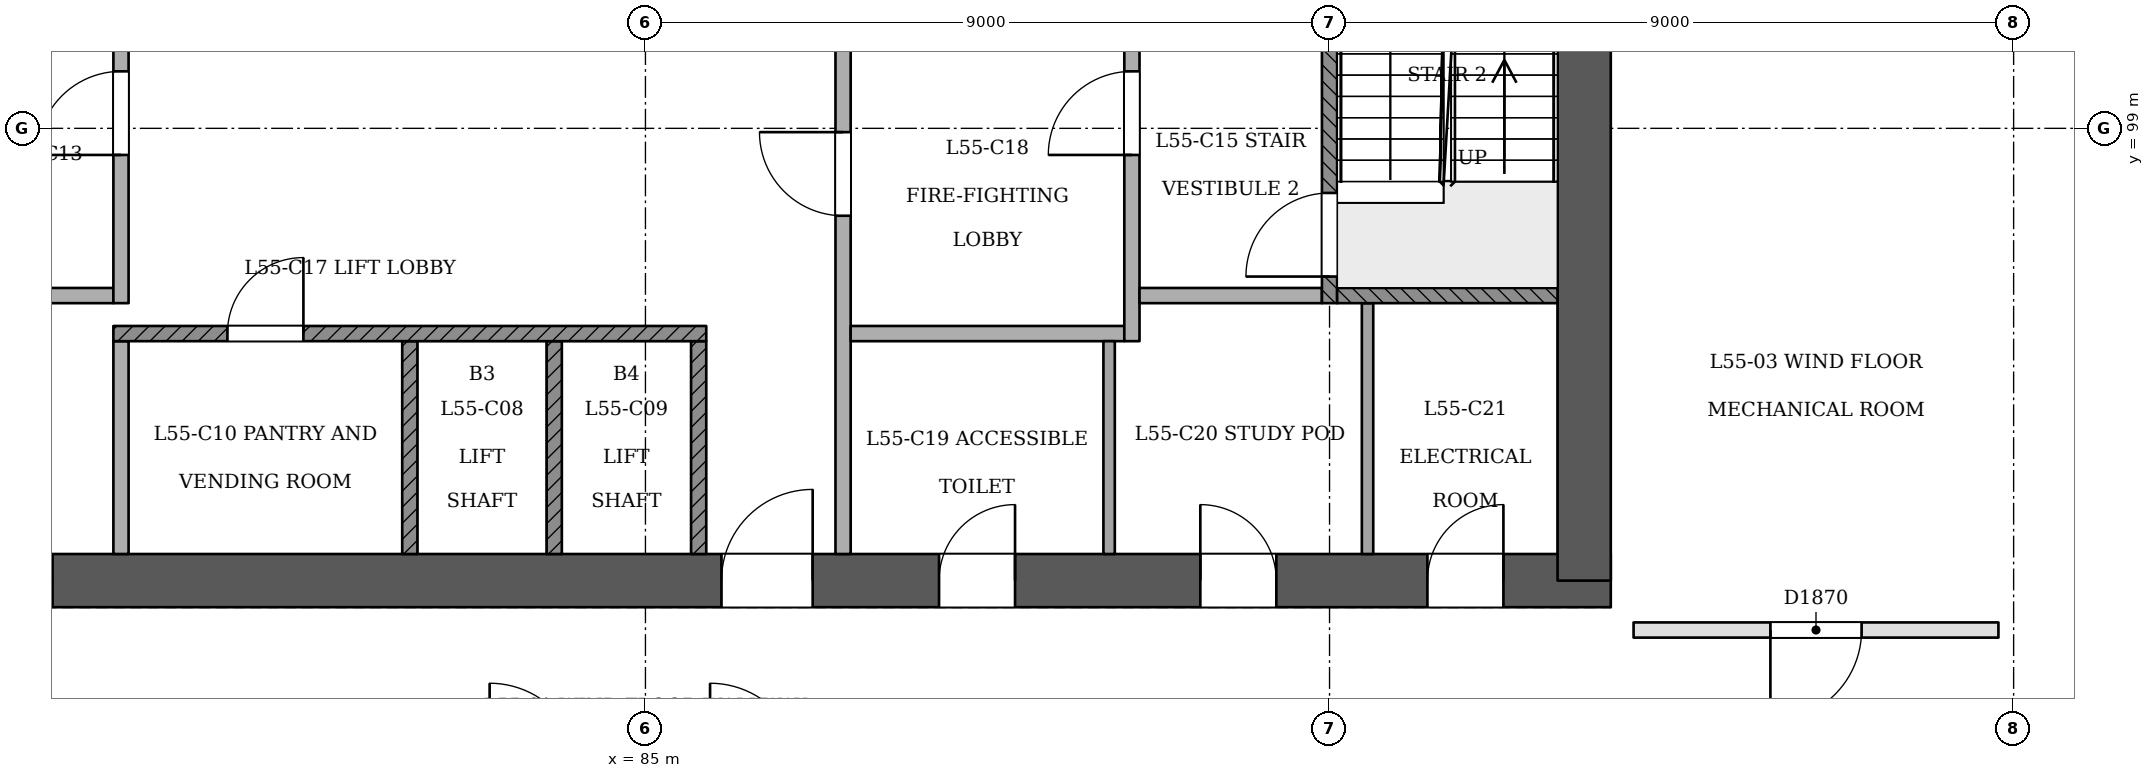
"""IFC4 building model, lengths in metres.
Left out: names, types, materials, properties, quantities, classifications, styles, units other than length and angle.
Written with IfcOpenShell. Run it as: python <this file> out.ifc"""

import sys

from ifc_helpers import new_model, si_unit, direction, frame, frame_2d, origin, place, context, subcontext, project, spatial, rectangle, extrude, element, fill, save


model = new_model("IFC4")
c1 = context("Model", 3, precision=1e-05, world=origin(), true_north=direction((0.0, 1.0)))
c2 = subcontext(c1, "Body", "Model", "MODEL_VIEW")
j1 = project(units=[si_unit("LENGTHUNIT", "METRE"), si_unit("PLANEANGLEUNIT", "RADIAN")], contexts=[c1])
p1 = place(None, origin())
s1 = spatial("IfcSite", under=j1, at=p1, CompositionType="ELEMENT")
p2 = place(p1, origin())
s2 = spatial("IfcBuilding", under=s1, at=p2, CompositionType="ELEMENT")
p3 = place(p2, frame((0.0, 0.0, 212.4)))
s3 = spatial("IfcBuildingStorey", under=s2, at=p3, CompositionType="ELEMENT", Elevation=212.4)
p4 = place(p3, frame((72.65, 93.05, 0.0), z_axis=(0.0, 0.0, 1.0), x_axis=(1.0, 0.0, 0.0)))
e1 = element("IfcWall", 1, at=p4, inside=s3, PredefinedType="SHEAR", context=c2, shape_type="SweptSolid", body=[
    extrude(rectangle(XDim=25.05, YDim=0.7, at=frame_2d((12.525, 0.0))), origin(), (0.0, 0.0, 1.0), 7.0),
])
p5 = place(p4, frame((1.15, 0.0, 0.0)))
e2 = element("IfcOpeningElement", 2, at=p5, cuts=e1, PredefinedType="OPENING", context=c2, shape_type="SweptSolid", body=[
    extrude(rectangle(XDim=1.2, YDim=2.1, at=frame_2d((0.6, 1.05))), frame((0.0, 0.36, 0.0), z_axis=(0.0, -1.0, 0.0), x_axis=(1.0, 0.0, 0.0)), (0.0, 0.0, 1.0), 0.721),
])
p6 = place(p4, frame((3.35, 0.0, 0.0)))
e3 = element("IfcOpeningElement", 3, at=p6, cuts=e1, PredefinedType="OPENING", context=c2, shape_type="SweptSolid", body=[
    extrude(rectangle(XDim=1.2, YDim=2.1, at=frame_2d((0.6, 1.05))), frame((0.0, 0.36, 0.0), z_axis=(0.0, -1.0, 0.0), x_axis=(1.0, 0.0, 0.0)), (0.0, 0.0, 1.0), 0.721),
])
p7 = place(p4, frame((13.35, 0.0, 0.0)))
e4 = element("IfcOpeningElement", 4, at=p7, cuts=e1, PredefinedType="OPENING", context=c2, shape_type="SweptSolid", body=[
    extrude(rectangle(XDim=1.2, YDim=2.1, at=frame_2d((0.6, 1.05))), frame((0.0, 0.36, 0.0), z_axis=(0.0, -1.0, 0.0), x_axis=(1.0, 0.0, 0.0)), (0.0, 0.0, 1.0), 0.721),
])
p8 = place(p4, frame((16.212, 0.0, 0.0)))
e5 = element("IfcOpeningElement", 5, at=p8, cuts=e1, PredefinedType="OPENING", context=c2, shape_type="SweptSolid", body=[
    extrude(rectangle(XDim=1.0, YDim=2.1, at=frame_2d((0.5, 1.05))), frame((0.0, 0.36, 0.0), z_axis=(0.0, -1.0, 0.0), x_axis=(1.0, 0.0, 0.0)), (0.0, 0.0, 1.0), 0.721),
])
p9 = place(p4, frame((19.65, 0.0, 0.0)))
e6 = element("IfcOpeningElement", 6, at=p9, cuts=e1, PredefinedType="OPENING", context=c2, shape_type="SweptSolid", body=[
    extrude(rectangle(XDim=1.0, YDim=2.1, at=frame_2d((0.5, 1.05))), frame((0.0, 0.36, 0.0), z_axis=(0.0, -1.0, 0.0), x_axis=(1.0, 0.0, 0.0)), (0.0, 0.0, 1.0), 0.721),
])
p10 = place(p4, frame((22.637, 0.0, 0.0)))
e7 = element("IfcOpeningElement", 7, at=p10, cuts=e1, PredefinedType="OPENING", context=c2, shape_type="SweptSolid", body=[
    extrude(rectangle(XDim=1.0, YDim=2.1, at=frame_2d((0.5, 1.05))), frame((0.0, 0.36, 0.0), z_axis=(0.0, -1.0, 0.0), x_axis=(1.0, 0.0, 0.0)), (0.0, 0.0, 1.0), 0.721),
])
p11 = place(p3, frame((97.35, 93.05, 0.0), z_axis=(0.0, 0.0, 1.0), x_axis=(0.0, 1.0, 0.0)))
e8 = element("IfcWall", 8, at=p11, inside=s3, PredefinedType="SHEAR", context=c2, shape_type="SweptSolid", body=[
    extrude(rectangle(XDim=11.05, YDim=0.7, at=frame_2d((5.525, 0.0))), origin(), (0.0, 0.0, 1.0), 7.0),
])
p12 = place(p3, frame((102.8, 92.4, 0.0), z_axis=(0.0, 0.0, 1.0), x_axis=(-1.0, 0.0, 0.0)))
e9 = element("IfcWall", 9, at=p12, inside=s3, PredefinedType="PARTITIONING", context=c2, shape_type="SweptSolid", body=[
    extrude(rectangle(XDim=4.8, YDim=0.2, at=frame_2d((2.4, 0.0))), origin(), (0.0, 0.0, 1.0), 6.6),
])
p13 = place(p12, frame((1.8, 0.0, 0.0)))
e10 = element("IfcOpeningElement", 10, at=p13, cuts=e9, PredefinedType="OPENING", context=c2, shape_type="SweptSolid", body=[
    extrude(rectangle(XDim=1.2, YDim=2.4, at=frame_2d((0.6, 1.2))), frame((0.0, 0.11, 0.0), z_axis=(0.0, -1.0, 0.0), x_axis=(1.0, 0.0, 0.0)), (0.0, 0.0, 1.0), 0.221),
])
p14 = place(p3, frame((78.1, 93.4, 0.0), z_axis=(0.0, 0.0, 1.0), x_axis=(0.0, 1.0, 0.0)))
e11 = element("IfcWall", 11, at=p14, inside=s3, PredefinedType="PARTITIONING", context=c2, shape_type="SweptSolid", body=[
    extrude(rectangle(XDim=2.8, YDim=0.2, at=frame_2d((1.4, 0.0))), origin(), (0.0, 0.0, 1.0), 6.6),
])
for number, where, z_axis, x_axis in (
    (12, (81.9, 93.4, 0.0), (0.0, 0.0, 1.0), (0.0, 1.0, 0.0)),
    (13, (83.8, 93.4, 0.0), (0.0, 0.0, 1.0), (0.0, 1.0, 0.0)),
    (14, (85.7, 93.4, 0.0), (0.0, 0.0, 1.0), (0.0, 1.0, 0.0)),
):
    element("IfcWall", number, at=place(p3, frame(where, z_axis=z_axis, x_axis=x_axis)), inside=s3, PredefinedType="SOLIDWALL", context=c2, shape_type="SweptSolid", body=[
        extrude(rectangle(XDim=2.8, YDim=0.2, at=frame_2d((1.4, 0.0))), origin(), (0.0, 0.0, 1.0), 6.6),
    ])
p15 = place(p3, frame((87.6, 93.4, 0.0), z_axis=(0.0, 0.0, 1.0), x_axis=(0.0, 1.0, 0.0)))
e15 = element("IfcWall", 15, at=p15, inside=s3, PredefinedType="PARTITIONING", context=c2, shape_type="SweptSolid", body=[
    extrude(rectangle(XDim=7.0, YDim=0.2, at=frame_2d((3.5, 0.0))), origin(), (0.0, 0.0, 1.0), 6.6),
])
p16 = place(p15, frame((4.45, 0.0, 0.0)))
e16 = element("IfcOpeningElement", 16, at=p16, cuts=e15, PredefinedType="OPENING", context=c2, shape_type="SweptSolid", body=[
    extrude(rectangle(XDim=1.1, YDim=2.1, at=frame_2d((0.55, 1.05))), frame((0.0, 0.11, 0.0), z_axis=(0.0, -1.0, 0.0), x_axis=(1.0, 0.0, 0.0)), (0.0, 0.0, 1.0), 0.221),
])
p17 = place(p3, frame((91.1, 93.4, 0.0), z_axis=(0.0, 0.0, 1.0), x_axis=(0.0, 1.0, 0.0)))
e17 = element("IfcWall", 17, at=p17, inside=s3, PredefinedType="PARTITIONING", context=c2, shape_type="SweptSolid", body=[
    extrude(rectangle(XDim=2.8, YDim=0.15, at=frame_2d((1.4, 0.0))), origin(), (0.0, 0.0, 1.0), 6.6),
])
p18 = place(p3, frame((94.5, 93.4, 0.0), z_axis=(0.0, 0.0, 1.0), x_axis=(0.0, 1.0, 0.0)))
e18 = element("IfcWall", 18, at=p18, inside=s3, PredefinedType="PARTITIONING", context=c2, shape_type="SweptSolid", body=[
    extrude(rectangle(XDim=3.3, YDim=0.15, at=frame_2d((1.65, 0.0))), origin(), (0.0, 0.0, 1.0), 6.6),
])
p19 = place(p3, frame((78.0, 96.3, 0.0), z_axis=(0.0, 0.0, 1.0), x_axis=(1.0, 0.0, 0.0)))
e19 = element("IfcWall", 19, at=p19, inside=s3, PredefinedType="SOLIDWALL", context=c2, shape_type="SweptSolid", body=[
    extrude(rectangle(XDim=7.8, YDim=0.2, at=frame_2d((3.9, 0.0))), origin(), (0.0, 0.0, 1.0), 6.6),
])
p20 = place(p19, frame((1.5, 0.0, 0.0)))
e20 = element("IfcOpeningElement", 20, at=p20, cuts=e19, PredefinedType="OPENING", context=c2, shape_type="SweptSolid", body=[
    extrude(rectangle(XDim=1.0, YDim=2.1, at=frame_2d((0.5, 1.05))), frame((0.0, 0.11, 0.0), z_axis=(0.0, -1.0, 0.0), x_axis=(1.0, 0.0, 0.0)), (0.0, 0.0, 1.0), 0.221),
])
p21 = place(p3, frame((87.7, 96.3, 0.0), z_axis=(0.0, 0.0, 1.0), x_axis=(1.0, 0.0, 0.0)))
e21 = element("IfcWall", 21, at=p21, inside=s3, PredefinedType="PARTITIONING", context=c2, shape_type="SweptSolid", body=[
    extrude(rectangle(XDim=3.6, YDim=0.2, at=frame_2d((1.8, 0.0))), origin(), (0.0, 0.0, 1.0), 6.6),
])
p22 = place(p3, frame((91.4, 96.2, 0.0), z_axis=(0.0, 0.0, 1.0), x_axis=(0.0, 1.0, 0.0)))
e22 = element("IfcWall", 22, at=p22, inside=s3, PredefinedType="PARTITIONING", context=c2, shape_type="SweptSolid", body=[
    extrude(rectangle(XDim=4.2, YDim=0.2, at=frame_2d((2.1, 0.0))), origin(), (0.0, 0.0, 1.0), 6.6),
])
p23 = place(p22, frame((2.45, 0.0, 0.0)))
e23 = element("IfcOpeningElement", 23, at=p23, cuts=e22, PredefinedType="OPENING", context=c2, shape_type="SweptSolid", body=[
    extrude(rectangle(XDim=1.1, YDim=2.1, at=frame_2d((0.55, 1.05))), frame((0.0, 0.11, 0.0), z_axis=(0.0, -1.0, 0.0), x_axis=(1.0, 0.0, 0.0)), (0.0, 0.0, 1.0), 0.221),
])
p24 = place(p3, frame((76.1, 96.8, 0.0), z_axis=(0.0, 0.0, 1.0), x_axis=(1.0, 0.0, 0.0)))
e24 = element("IfcWall", 24, at=p24, inside=s3, PredefinedType="PARTITIONING", context=c2, shape_type="SweptSolid", body=[
    extrude(rectangle(XDim=1.9, YDim=0.2, at=frame_2d((0.95, 0.0))), origin(), (0.0, 0.0, 1.0), 6.6),
])
p25 = place(p3, frame((78.1, 96.7, 0.0), z_axis=(0.0, 0.0, 1.0), x_axis=(0.0, 1.0, 0.0)))
e25 = element("IfcWall", 25, at=p25, inside=s3, PredefinedType="PARTITIONING", context=c2, shape_type="SweptSolid", body=[
    extrude(rectangle(XDim=3.7, YDim=0.2, at=frame_2d((1.85, 0.0))), origin(), (0.0, 0.0, 1.0), 6.6),
])
p26 = place(p25, frame((1.95, 0.0, 0.0)))
e26 = element("IfcOpeningElement", 26, at=p26, cuts=e25, PredefinedType="OPENING", context=c2, shape_type="SweptSolid", body=[
    extrude(rectangle(XDim=1.1, YDim=2.1, at=frame_2d((0.55, 1.05))), frame((0.0, 0.11, 0.0), z_axis=(0.0, -1.0, 0.0), x_axis=(1.0, 0.0, 0.0)), (0.0, 0.0, 1.0), 0.221),
])
p27 = place(p3, frame((91.5, 96.8, 0.0), z_axis=(0.0, 0.0, 1.0), x_axis=(1.0, 0.0, 0.0)))
e27 = element("IfcWall", 27, at=p27, inside=s3, PredefinedType="PARTITIONING", context=c2, shape_type="SweptSolid", body=[
    extrude(rectangle(XDim=2.4, YDim=0.2, at=frame_2d((1.2, 0.0))), origin(), (0.0, 0.0, 1.0), 6.6),
])
p28 = place(p3, frame((94.0, 96.7, 0.0), z_axis=(0.0, 0.0, 1.0), x_axis=(0.0, 1.0, 0.0)))
e28 = element("IfcWall", 28, at=p28, inside=s3, PredefinedType="SOLIDWALL", context=c2, shape_type="SweptSolid", body=[
    extrude(rectangle(XDim=3.7, YDim=0.2, at=frame_2d((1.85, 0.0))), origin(), (0.0, 0.0, 1.0), 6.6),
])
p29 = place(p28, frame((0.35, 0.0, 0.0)))
e29 = element("IfcOpeningElement", 29, at=p29, cuts=e28, PredefinedType="OPENING", context=c2, shape_type="SweptSolid", body=[
    extrude(rectangle(XDim=1.1, YDim=2.1, at=frame_2d((0.55, 1.05))), frame((0.0, 0.11, 0.0), z_axis=(0.0, -1.0, 0.0), x_axis=(1.0, 0.0, 0.0)), (0.0, 0.0, 1.0), 0.221),
])
p30 = place(p3, frame((94.1, 96.8, 0.0), z_axis=(0.0, 0.0, 1.0), x_axis=(1.0, 0.0, 0.0)))
e30 = element("IfcWall", 30, at=p30, inside=s3, PredefinedType="SOLIDWALL", context=c2, shape_type="SweptSolid", body=[
    extrude(rectangle(XDim=2.9, YDim=0.2, at=frame_2d((1.45, 0.0))), origin(), (0.0, 0.0, 1.0), 6.6),
])
p31 = place(p13, origin())
e31 = element("IfcDoor", 31, at=p31, inside=s3, OperationType="SINGLE_SWING_RIGHT", PredefinedType="NOTDEFINED", context=c2, shape_type="SweptSolid", body=[
    extrude(rectangle(XDim=1.2, YDim=2.4, at=frame_2d((0.6, 1.2))), frame((0.0, 0.025, 0.0), z_axis=(0.0, -1.0, 0.0), x_axis=(1.0, 0.0, 0.0)), (0.0, 0.0, 1.0), 0.05),
])
fill(e10, e31)
p32 = place(p29, origin())
e32 = element("IfcDoor", 32, at=p32, inside=s3, OperationType="SINGLE_SWING_LEFT", PredefinedType="NOTDEFINED", context=c2, shape_type="SweptSolid", body=[
    extrude(rectangle(XDim=1.1, YDim=2.1, at=frame_2d((0.55, 1.05))), frame((0.0, 0.025, 0.0), z_axis=(0.0, -1.0, 0.0), x_axis=(1.0, 0.0, 0.0)), (0.0, 0.0, 1.0), 0.05),
])
fill(e29, e32)
p33 = place(p26, origin())
e33 = element("IfcDoor", 33, at=p33, inside=s3, OperationType="SINGLE_SWING_LEFT", PredefinedType="NOTDEFINED", context=c2, shape_type="SweptSolid", body=[
    extrude(rectangle(XDim=1.1, YDim=2.1, at=frame_2d((0.55, 1.05))), frame((0.0, 0.025, 0.0), z_axis=(0.0, -1.0, 0.0), x_axis=(1.0, 0.0, 0.0)), (0.0, 0.0, 1.0), 0.05),
])
fill(e26, e33)
p34 = place(p16, origin())
e34 = element("IfcDoor", 34, at=p34, inside=s3, OperationType="SINGLE_SWING_RIGHT", PredefinedType="NOTDEFINED", context=c2, shape_type="SweptSolid", body=[
    extrude(rectangle(XDim=1.1, YDim=2.1, at=frame_2d((0.55, 1.05))), frame((0.0, 0.025, 0.0), z_axis=(0.0, -1.0, 0.0), x_axis=(1.0, 0.0, 0.0)), (0.0, 0.0, 1.0), 0.05),
])
fill(e16, e34)
p35 = place(p23, origin())
e35 = element("IfcDoor", 35, at=p35, inside=s3, OperationType="SINGLE_SWING_LEFT", PredefinedType="NOTDEFINED", context=c2, shape_type="SweptSolid", body=[
    extrude(rectangle(XDim=1.1, YDim=2.1, at=frame_2d((0.55, 1.05))), frame((0.0, 0.025, 0.0), z_axis=(0.0, -1.0, 0.0), x_axis=(1.0, 0.0, 0.0)), (0.0, 0.0, 1.0), 0.05),
])
fill(e23, e35)
p36 = place(p6, origin())
e36 = element("IfcDoor", 36, at=p36, inside=s3, OperationType="SINGLE_SWING_LEFT", PredefinedType="NOTDEFINED", context=c2, shape_type="SweptSolid", body=[
    extrude(rectangle(XDim=1.2, YDim=2.1, at=frame_2d((0.6, 1.05))), frame((0.0, 0.025, 0.0), z_axis=(0.0, -1.0, 0.0), x_axis=(1.0, 0.0, 0.0)), (0.0, 0.0, 1.0), 0.05),
])
fill(e3, e36)
p37 = place(p7, origin())
e37 = element("IfcDoor", 37, at=p37, inside=s3, OperationType="SINGLE_SWING_RIGHT", PredefinedType="NOTDEFINED", context=c2, shape_type="SweptSolid", body=[
    extrude(rectangle(XDim=1.2, YDim=2.1, at=frame_2d((0.6, 1.05))), frame((0.0, 0.025, 0.0), z_axis=(0.0, -1.0, 0.0), x_axis=(1.0, 0.0, 0.0)), (0.0, 0.0, 1.0), 0.05),
])
fill(e4, e37)
p38 = place(p8, origin())
e38 = element("IfcDoor", 38, at=p38, inside=s3, OperationType="SINGLE_SWING_RIGHT", PredefinedType="NOTDEFINED", context=c2, shape_type="SweptSolid", body=[
    extrude(rectangle(XDim=1.0, YDim=2.1, at=frame_2d((0.5, 1.05))), frame((0.0, 0.025, 0.0), z_axis=(0.0, -1.0, 0.0), x_axis=(1.0, 0.0, 0.0)), (0.0, 0.0, 1.0), 0.05),
])
fill(e5, e38)
p39 = place(p9, origin())
e39 = element("IfcDoor", 39, at=p39, inside=s3, OperationType="SINGLE_SWING_LEFT", PredefinedType="NOTDEFINED", context=c2, shape_type="SweptSolid", body=[
    extrude(rectangle(XDim=1.0, YDim=2.1, at=frame_2d((0.5, 1.05))), frame((0.0, 0.025, 0.0), z_axis=(0.0, -1.0, 0.0), x_axis=(1.0, 0.0, 0.0)), (0.0, 0.0, 1.0), 0.05),
])
fill(e6, e39)
p40 = place(p10, origin())
e40 = element("IfcDoor", 40, at=p40, inside=s3, OperationType="SINGLE_SWING_RIGHT", PredefinedType="NOTDEFINED", context=c2, shape_type="SweptSolid", body=[
    extrude(rectangle(XDim=1.0, YDim=2.1, at=frame_2d((0.5, 1.05))), frame((0.0, 0.025, 0.0), z_axis=(0.0, -1.0, 0.0), x_axis=(1.0, 0.0, 0.0)), (0.0, 0.0, 1.0), 0.05),
])
fill(e7, e40)
p41 = place(p20, origin())
e41 = element("IfcDoor", 41, at=p41, inside=s3, OperationType="SINGLE_SWING_RIGHT", PredefinedType="NOTDEFINED", context=c2, shape_type="SweptSolid", body=[
    extrude(rectangle(XDim=1.0, YDim=2.1, at=frame_2d((0.5, 1.05))), frame((0.0, 0.025, 0.0), z_axis=(0.0, -1.0, 0.0), x_axis=(1.0, 0.0, 0.0)), (0.0, 0.0, 1.0), 0.05),
])
fill(e20, e41)
save(model, sys.argv[1])
